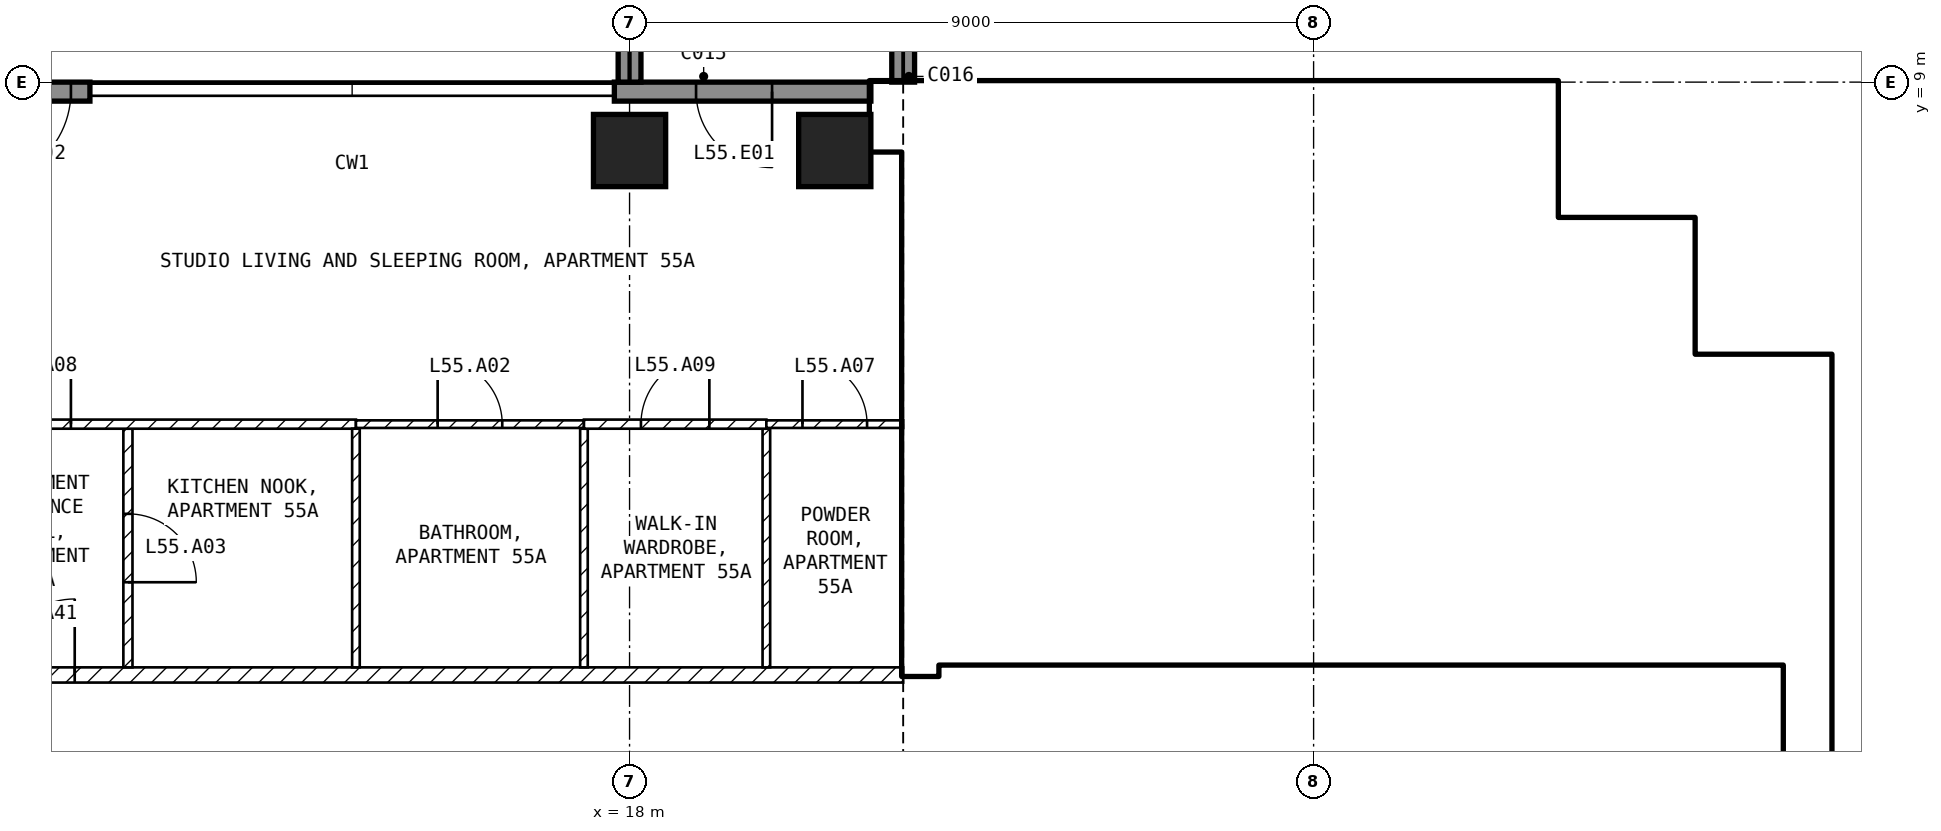
"""IFC4 building model, lengths in metres.
Left out: names, types, materials, properties, quantities, classifications, styles, units other than length and angle.
Written with IfcOpenShell. Run it as: python <this file> out.ifc"""

import sys

from ifc_helpers import new_model, si_unit, direction, frame, frame_2d, origin, origin_2d, place, context, subcontext, project, spatial, rectangle, extrude, element, fill, save


model = new_model("IFC4")
c1 = context("Model", 3, precision=1e-05, world=origin(), true_north=direction((0.0, 1.0)))
c2 = subcontext(c1, "Body", "Model", "MODEL_VIEW")
j1 = project(units=[si_unit("LENGTHUNIT", "METRE"), si_unit("PLANEANGLEUNIT", "RADIAN")], contexts=[c1])
p1 = place(None, origin())
s1 = spatial("IfcSite", under=j1, at=p1, CompositionType="ELEMENT")
p2 = place(p1, origin())
s2 = spatial("IfcBuilding", under=s1, at=p2, CompositionType="ELEMENT")
p3 = place(p2, frame((0.0, 0.0, 219.1)))
s3 = spatial("IfcBuildingStorey", under=s2, at=p3, CompositionType="ELEMENT", Elevation=219.1)
for number, where, z_axis, x_axis in (
    (1, (18.0, 8.1, -0.25), (0.0, 0.0, 1.0), (1.0, 0.0, 0.0)),
    (2, (20.7, 8.1, -0.25), (0.0, 0.0, 1.0), (1.0, 0.0, 0.0)),
):
    element("IfcColumn", number, at=place(p3, frame(where, z_axis=z_axis, x_axis=x_axis)), inside=s3, PredefinedType="COLUMN", context=c2, shape_type="SweptSolid", body=[
        extrude(rectangle(XDim=0.95, YDim=0.95, at=origin_2d()), origin(), (0.0, 0.0, 1.0), 3.45),
    ])
p4 = place(p3, frame((21.175, 8.875, 0.0), z_axis=(0.0, 0.0, 1.0), x_axis=(-1.0, 0.0, 0.0)))
e3 = element("IfcWall", 3, at=p4, inside=s3, PredefinedType="SOLIDWALL", context=c2, shape_type="SweptSolid", body=[
    extrude(rectangle(XDim=3.375, YDim=0.25, at=frame_2d((1.688, 0.0))), origin(), (0.0, 0.0, 1.0), 3.2),
])
p5 = place(p4, frame((1.3, 0.0, 0.0)))
e4 = element("IfcOpeningElement", 4, at=p5, cuts=e3, PredefinedType="OPENING", context=c2, shape_type="SweptSolid", body=[
    extrude(rectangle(XDim=1.0, YDim=2.4, at=frame_2d((0.5, 1.2))), frame((0.0, 0.135, 0.0), z_axis=(0.0, -1.0, 0.0), x_axis=(1.0, 0.0, 0.0)), (0.0, 0.0, 1.0), 0.27),
])
p6 = place(p3, frame((10.9, 8.875, 0.0), z_axis=(0.0, 0.0, 1.0), x_axis=(-1.0, 0.0, 0.0)))
e5 = element("IfcWall", 5, at=p6, inside=s3, PredefinedType="SOLIDWALL", context=c2, shape_type="SweptSolid", body=[
    extrude(rectangle(XDim=1.84, YDim=0.25, at=frame_2d((0.92, 0.0))), origin(), (0.0, 0.0, 1.0), 3.2),
])
p7 = place(p6, frame((0.25, 0.0, 0.0)))
e6 = element("IfcOpeningElement", 6, at=p7, cuts=e5, PredefinedType="OPENING", context=c2, shape_type="SweptSolid", body=[
    extrude(rectangle(XDim=1.2, YDim=2.4, at=frame_2d((0.6, 1.2))), frame((0.0, 0.135, 0.0), z_axis=(0.0, -1.0, 0.0), x_axis=(1.0, 0.0, 0.0)), (0.0, 0.0, 1.0), 0.27),
])
for number, where, z_axis, x_axis in (
    (7, (18.0, 9.0, 0.0), (0.0, 0.0, 1.0), (0.0, 1.0, 0.0)),
    (8, (21.6, 9.0, 0.0), (0.0, 0.0, 1.0), (0.0, 1.0, 0.0)),
):
    element("IfcWall", number, at=place(p3, frame(where, z_axis=z_axis, x_axis=x_axis)), inside=s3, PredefinedType="SOLIDWALL", context=c2, shape_type="SweptSolid", body=[
        extrude(rectangle(XDim=2.7, YDim=0.3, at=frame_2d((1.35, 0.0))), origin(), (0.0, 0.0, 1.0), 3.2),
    ])
p8 = place(p3, frame((33.5, -4.8, 0.0), z_axis=(0.0, 0.0, 1.0), x_axis=(0.0, 1.0, 0.0)))
e9 = element("IfcWall", 9, at=p8, inside=s3, PredefinedType="SHEAR", context=c2, shape_type="SweptSolid", body=[
    extrude(rectangle(XDim=10.2, YDim=0.6, at=frame_2d((5.1, 0.0))), origin(), (0.0, 0.0, 1.0), 3.2),
])
for number, where, z_axis, x_axis in (
    (10, (31.4, 5.1, 0.0), (0.0, 0.0, 1.0), (1.0, 0.0, 0.0)),
    (11, (31.7, 5.4, 0.0), (0.0, 0.0, 1.0), (0.0, 1.0, 0.0)),
):
    element("IfcWall", number, at=place(p3, frame(where, z_axis=z_axis, x_axis=x_axis)), inside=s3, PredefinedType="SHEAR", context=c2, shape_type="SweptSolid", body=[
        extrude(rectangle(XDim=1.8, YDim=0.6, at=frame_2d((0.9, 0.0))), origin(), (0.0, 0.0, 1.0), 3.2),
    ])
p9 = place(p3, frame((29.075, 6.9, 0.0), z_axis=(0.0, 0.0, 1.0), x_axis=(1.0, 0.0, 0.0)))
e12 = element("IfcWall", 12, at=p9, inside=s3, PredefinedType="SHEAR", context=c2, shape_type="SweptSolid", body=[
    extrude(rectangle(XDim=2.325, YDim=0.6, at=frame_2d((1.163, 0.0))), origin(), (0.0, 0.0, 1.0), 3.2),
])
p10 = place(p3, frame((29.9, 7.2, 0.0), z_axis=(0.0, 0.0, 1.0), x_axis=(0.0, 1.0, 0.0)))
e13 = element("IfcWall", 13, at=p10, inside=s3, PredefinedType="SHEAR", context=c2, shape_type="SweptSolid", body=[
    extrude(rectangle(XDim=1.8, YDim=0.6, at=frame_2d((0.9, 0.0))), origin(), (0.0, 0.0, 1.0), 3.2),
])
p11 = place(p3, frame((21.175, 8.55, 0.0), z_axis=(0.0, 0.0, 1.0), x_axis=(1.0, 0.0, 0.0)))
e14 = element("IfcWall", 14, at=p11, inside=s3, PredefinedType="SHEAR", context=c2, shape_type="SweptSolid", body=[
    extrude(rectangle(XDim=8.425, YDim=0.9, at=frame_2d((4.212, 0.0))), origin(), (0.0, 0.0, 1.0), 3.2),
])
p12 = place(p3, frame((21.825, 1.2, 0.0), z_axis=(0.0, 0.0, 1.0), x_axis=(0.0, 1.0, 0.0)))
e15 = element("IfcWall", 15, at=p12, inside=s3, PredefinedType="SHEAR", context=c2, shape_type="SweptSolid", body=[
    extrude(rectangle(XDim=6.9, YDim=0.45, at=frame_2d((3.45, 0.0))), origin(), (0.0, 0.0, 1.0), 3.2),
])
p13 = place(p3, frame((22.05, 1.45, 0.0), z_axis=(0.0, 0.0, 1.0), x_axis=(1.0, 0.0, 0.0)))
e16 = element("IfcWall", 16, at=p13, inside=s3, PredefinedType="SOLIDWALL", context=c2, shape_type="SweptSolid", body=[
    extrude(rectangle(XDim=11.15, YDim=0.2, at=frame_2d((5.575, 0.0))), origin(), (0.0, 0.0, 1.0), 3.2),
])
p14 = place(p13, frame((0.75, 0.0, 0.0)))
e17 = element("IfcOpeningElement", 17, at=p14, cuts=e16, PredefinedType="OPENING", context=c2, shape_type="SweptSolid", body=[
    extrude(rectangle(XDim=1.0, YDim=2.1, at=frame_2d((0.5, 1.05))), frame((0.0, 0.11, 0.0), z_axis=(0.0, -1.0, 0.0), x_axis=(1.0, 0.0, 0.0)), (0.0, 0.0, 1.0), 0.22),
])
p15 = place(p13, frame((3.25, 0.0, 0.0)))
e18 = element("IfcOpeningElement", 18, at=p15, cuts=e16, PredefinedType="OPENING", context=c2, shape_type="SweptSolid", body=[
    extrude(rectangle(XDim=1.0, YDim=2.1, at=frame_2d((0.5, 1.05))), frame((0.0, 0.11, 0.0), z_axis=(0.0, -1.0, 0.0), x_axis=(1.0, 0.0, 0.0)), (0.0, 0.0, 1.0), 0.22),
])
p16 = place(p13, frame((9.15, 0.0, 0.0)))
e19 = element("IfcOpeningElement", 19, at=p16, cuts=e16, PredefinedType="OPENING", context=c2, shape_type="SweptSolid", body=[
    extrude(rectangle(XDim=0.9, YDim=2.1, at=frame_2d((0.45, 1.05))), frame((0.0, 0.11, 0.0), z_axis=(0.0, -1.0, 0.0), x_axis=(1.0, 0.0, 0.0)), (0.0, 0.0, 1.0), 0.22),
])
p17 = place(p3, frame((22.05, 5.15, 0.0), z_axis=(0.0, 0.0, 1.0), x_axis=(1.0, 0.0, 0.0)))
e20 = element("IfcWall", 20, at=p17, inside=s3, PredefinedType="SOLIDWALL", context=c2, shape_type="SweptSolid", body=[
    extrude(rectangle(XDim=6.3, YDim=0.2, at=frame_2d((3.15, 0.0))), origin(), (0.0, 0.0, 1.0), 3.2),
])
p18 = place(p17, frame((0.2, 0.0, 0.0)))
e21 = element("IfcOpeningElement", 21, at=p18, cuts=e20, PredefinedType="OPENING", context=c2, shape_type="SweptSolid", body=[
    extrude(rectangle(XDim=1.0, YDim=2.1, at=frame_2d((0.5, 1.05))), frame((0.0, 0.11, 0.0), z_axis=(0.0, -1.0, 0.0), x_axis=(1.0, 0.0, 0.0)), (0.0, 0.0, 1.0), 0.22),
])
p19 = place(p3, frame((28.25, 5.25, 0.0), z_axis=(0.0, 0.0, 1.0), x_axis=(0.0, 1.0, 0.0)))
e22 = element("IfcWall", 22, at=p19, inside=s3, PredefinedType="SOLIDWALL", context=c2, shape_type="SweptSolid", body=[
    extrude(rectangle(XDim=2.85, YDim=0.2, at=frame_2d((1.425, 0.0))), origin(), (0.0, 0.0, 1.0), 3.2),
])
p20 = place(p3, frame((27.2, 3.95, 0.0), z_axis=(0.0, 0.0, 1.0), x_axis=(1.0, 0.0, 0.0)))
e23 = element("IfcWall", 23, at=p20, inside=s3, PredefinedType="SOLIDWALL", context=c2, shape_type="SweptSolid", body=[
    extrude(rectangle(XDim=6.0, YDim=0.2, at=frame_2d((3.0, 0.0))), origin(), (0.0, 0.0, 1.0), 3.2),
])
p21 = place(p3, frame((27.1, 1.55, 0.0), z_axis=(0.0, 0.0, 1.0), x_axis=(0.0, 1.0, 0.0)))
e24 = element("IfcWall", 24, at=p21, inside=s3, PredefinedType="SOLIDWALL", context=c2, shape_type="SweptSolid", body=[
    extrude(rectangle(XDim=3.5, YDim=0.2, at=frame_2d((1.75, 0.0))), origin(), (0.0, 0.0, 1.0), 3.2),
])
p22 = place(p21, frame((0.6, 0.0, 0.0)))
e25 = element("IfcOpeningElement", 25, at=p22, cuts=e24, PredefinedType="OPENING", context=c2, shape_type="SweptSolid", body=[
    extrude(rectangle(XDim=1.1, YDim=2.1, at=frame_2d((0.55, 1.05))), frame((0.0, 0.11, 0.0), z_axis=(0.0, -1.0, 0.0), x_axis=(1.0, 0.0, 0.0)), (0.0, 0.0, 1.0), 0.22),
])
p23 = place(p21, frame((2.6, 0.0, 0.0)))
e26 = element("IfcOpeningElement", 26, at=p23, cuts=e24, PredefinedType="OPENING", context=c2, shape_type="SweptSolid", body=[
    extrude(rectangle(XDim=0.8, YDim=2.1, at=frame_2d((0.4, 1.05))), frame((0.0, 0.11, 0.0), z_axis=(0.0, -1.0, 0.0), x_axis=(1.0, 0.0, 0.0)), (0.0, 0.0, 1.0), 0.22),
])
p24 = place(p3, frame((30.0, 1.55, 0.0), z_axis=(0.0, 0.0, 1.0), x_axis=(0.0, 1.0, 0.0)))
e27 = element("IfcWall", 27, at=p24, inside=s3, PredefinedType="SOLIDWALL", context=c2, shape_type="SweptSolid", body=[
    extrude(rectangle(XDim=2.3, YDim=0.2, at=frame_2d((1.15, 0.0))), origin(), (0.0, 0.0, 1.0), 3.2),
])
p25 = place(p3, frame((29.0, 4.05, 0.0), z_axis=(0.0, 0.0, 1.0), x_axis=(0.0, 1.0, 0.0)))
e28 = element("IfcWall", 28, at=p25, inside=s3, PredefinedType="PARTITIONING", context=c2, shape_type="SweptSolid", body=[
    extrude(rectangle(XDim=4.05, YDim=0.15, at=frame_2d((2.025, 0.0))), origin(), (0.0, 0.0, 1.0), 3.2),
])
p26 = place(p25, frame((0.1, 0.0, 0.0)))
e29 = element("IfcOpeningElement", 29, at=p26, cuts=e28, PredefinedType="OPENING", context=c2, shape_type="SweptSolid", body=[
    extrude(rectangle(XDim=0.8, YDim=2.1, at=frame_2d((0.4, 1.05))), frame((0.0, 0.085, 0.0), z_axis=(0.0, -1.0, 0.0), x_axis=(1.0, 0.0, 0.0)), (0.0, 0.0, 1.0), 0.17),
])
p27 = place(p3, frame((4.4, 1.2, 0.0), z_axis=(0.0, 0.0, 1.0), x_axis=(1.0, 0.0, 0.0)))
e30 = element("IfcWall", 30, at=p27, inside=s3, PredefinedType="PARTITIONING", context=c2, shape_type="SweptSolid", body=[
    extrude(rectangle(XDim=17.2, YDim=0.2, at=frame_2d((8.6, 0.0))), origin(), (0.0, 0.0, 1.0), 3.2),
])
p28 = place(p27, frame((5.3, 0.0, 0.0)))
e31 = element("IfcOpeningElement", 31, at=p28, cuts=e30, PredefinedType="OPENING", context=c2, shape_type="SweptSolid", body=[
    extrude(rectangle(XDim=1.0, YDim=2.1, at=frame_2d((0.5, 1.05))), frame((0.0, 0.11, 0.0), z_axis=(0.0, -1.0, 0.0), x_axis=(1.0, 0.0, 0.0)), (0.0, 0.0, 1.0), 0.22),
])
p29 = place(p3, frame((11.4, 4.44, 0.0), z_axis=(0.0, 0.0, 1.0), x_axis=(0.0, -1.0, 0.0)))
e32 = element("IfcWall", 32, at=p29, inside=s3, PredefinedType="PARTITIONING", context=c2, shape_type="SweptSolid", body=[
    extrude(rectangle(XDim=3.14, YDim=0.12, at=frame_2d((1.57, 0.0))), origin(), (0.0, 0.0, 1.0), 3.2),
])
p30 = place(p29, frame((1.12, 0.0, 0.0)))
e33 = element("IfcOpeningElement", 33, at=p30, cuts=e32, PredefinedType="OPENING", context=c2, shape_type="SweptSolid", body=[
    extrude(rectangle(XDim=0.9, YDim=2.1, at=frame_2d((0.45, 1.05))), frame((0.0, 0.07, 0.0), z_axis=(0.0, -1.0, 0.0), x_axis=(1.0, 0.0, 0.0)), (0.0, 0.0, 1.0), 0.14),
])
p31 = place(p3, frame((8.94, 4.5, 0.0), z_axis=(0.0, 0.0, 1.0), x_axis=(1.0, 0.0, 0.0)))
e34 = element("IfcWall", 34, at=p31, inside=s3, PredefinedType="PARTITIONING", context=c2, shape_type="SweptSolid", body=[
    extrude(rectangle(XDim=5.46, YDim=0.12, at=frame_2d((2.73, 0.0))), origin(), (0.0, 0.0, 1.0), 3.2),
])
p32 = place(p31, frame((0.81, 0.0, 0.0)))
e35 = element("IfcOpeningElement", 35, at=p32, cuts=e34, PredefinedType="OPENING", context=c2, shape_type="SweptSolid", body=[
    extrude(rectangle(XDim=0.9, YDim=2.1, at=frame_2d((0.45, 1.05))), frame((0.0, 0.07, 0.0), z_axis=(0.0, -1.0, 0.0), x_axis=(1.0, 0.0, 0.0)), (0.0, 0.0, 1.0), 0.14),
])
for number, where, z_axis, x_axis in (
    (36, (14.4, 4.44, 0.0), (0.0, 0.0, 1.0), (0.0, -1.0, 0.0)),
    (37, (17.4, 4.44, 0.0), (0.0, 0.0, 1.0), (0.0, -1.0, 0.0)),
):
    element("IfcWall", number, at=place(p3, frame(where, z_axis=z_axis, x_axis=x_axis)), inside=s3, PredefinedType="PARTITIONING", context=c2, shape_type="SweptSolid", body=[
        extrude(rectangle(XDim=3.14, YDim=0.1, at=frame_2d((1.57, 0.0))), origin(), (0.0, 0.0, 1.0), 3.2),
    ])
p33 = place(p3, frame((14.4, 4.5, 0.0), z_axis=(0.0, 0.0, 1.0), x_axis=(1.0, 0.0, 0.0)))
e38 = element("IfcWall", 38, at=p33, inside=s3, PredefinedType="PARTITIONING", context=c2, shape_type="SweptSolid", body=[
    extrude(rectangle(XDim=3.0, YDim=0.1, at=frame_2d((1.5, 0.0))), origin(), (0.0, 0.0, 1.0), 3.2),
])
p34 = place(p33, frame((1.075, 0.0, 0.0)))
e39 = element("IfcOpeningElement", 39, at=p34, cuts=e38, PredefinedType="OPENING", context=c2, shape_type="SweptSolid", body=[
    extrude(rectangle(XDim=0.85, YDim=2.1, at=frame_2d((0.425, 1.05))), frame((0.0, 0.06, 0.0), z_axis=(0.0, -1.0, 0.0), x_axis=(1.0, 0.0, 0.0)), (0.0, 0.0, 1.0), 0.12),
])
p35 = place(p3, frame((19.8, 4.44, 0.0), z_axis=(0.0, 0.0, 1.0), x_axis=(0.0, -1.0, 0.0)))
e40 = element("IfcWall", 40, at=p35, inside=s3, PredefinedType="PARTITIONING", context=c2, shape_type="SweptSolid", body=[
    extrude(rectangle(XDim=3.14, YDim=0.1, at=frame_2d((1.57, 0.0))), origin(), (0.0, 0.0, 1.0), 3.2),
])
p36 = place(p3, frame((17.4, 4.5, 0.0), z_axis=(0.0, 0.0, 1.0), x_axis=(1.0, 0.0, 0.0)))
e41 = element("IfcWall", 41, at=p36, inside=s3, PredefinedType="PARTITIONING", context=c2, shape_type="SweptSolid", body=[
    extrude(rectangle(XDim=2.4, YDim=0.12, at=frame_2d((1.2, 0.0))), origin(), (0.0, 0.0, 1.0), 3.2),
])
p37 = place(p36, frame((0.75, 0.0, 0.0)))
e42 = element("IfcOpeningElement", 42, at=p37, cuts=e41, PredefinedType="OPENING", context=c2, shape_type="SweptSolid", body=[
    extrude(rectangle(XDim=0.9, YDim=2.1, at=frame_2d((0.45, 1.05))), frame((0.0, 0.07, 0.0), z_axis=(0.0, -1.0, 0.0), x_axis=(1.0, 0.0, 0.0)), (0.0, 0.0, 1.0), 0.14),
])
p38 = place(p3, frame((19.8, 4.5, 0.0), z_axis=(0.0, 0.0, 1.0), x_axis=(1.0, 0.0, 0.0)))
e43 = element("IfcWall", 43, at=p38, inside=s3, PredefinedType="PARTITIONING", context=c2, shape_type="SweptSolid", body=[
    extrude(rectangle(XDim=1.8, YDim=0.1, at=frame_2d((0.9, 0.0))), origin(), (0.0, 0.0, 1.0), 3.2),
])
p39 = place(p38, frame((0.475, 0.0, 0.0)))
e44 = element("IfcOpeningElement", 44, at=p39, cuts=e43, PredefinedType="OPENING", context=c2, shape_type="SweptSolid", body=[
    extrude(rectangle(XDim=0.85, YDim=2.1, at=frame_2d((0.425, 1.05))), frame((0.0, 0.06, 0.0), z_axis=(0.0, -1.0, 0.0), x_axis=(1.0, 0.0, 0.0)), (0.0, 0.0, 1.0), 0.12),
])
p40 = place(p5, origin())
e45 = element("IfcDoor", 45, at=p40, inside=s3, OperationType="SINGLE_SWING_LEFT", PredefinedType="DOOR", context=c2, shape_type="SweptSolid", body=[
    extrude(rectangle(XDim=1.0, YDim=2.4, at=frame_2d((0.5, 1.2))), frame((0.0, 0.025, 0.0), z_axis=(0.0, -1.0, 0.0), x_axis=(1.0, 0.0, 0.0)), (0.0, 0.0, 1.0), 0.05),
])
fill(e4, e45)
p41 = place(p7, origin())
e46 = element("IfcDoor", 46, at=p41, inside=s3, OperationType="SINGLE_SWING_RIGHT", PredefinedType="DOOR", context=c2, shape_type="SweptSolid", body=[
    extrude(rectangle(XDim=1.2, YDim=2.4, at=frame_2d((0.6, 1.2))), frame((0.0, 0.025, 0.0), z_axis=(0.0, -1.0, 0.0), x_axis=(1.0, 0.0, 0.0)), (0.0, 0.0, 1.0), 0.05),
])
fill(e6, e46)
p42 = place(p22, origin())
e47 = element("IfcDoor", 47, at=p42, inside=s3, OperationType="DOUBLE_DOOR_SLIDING", PredefinedType="DOOR", context=c2, shape_type="SweptSolid", body=[
    extrude(rectangle(XDim=1.1, YDim=2.1, at=frame_2d((0.55, 1.05))), frame((0.0, 0.025, 0.0), z_axis=(0.0, -1.0, 0.0), x_axis=(1.0, 0.0, 0.0)), (0.0, 0.0, 1.0), 0.05),
])
fill(e25, e47)
p43 = place(p18, origin())
e48 = element("IfcDoor", 48, at=p43, inside=s3, OperationType="SINGLE_SWING_LEFT", PredefinedType="DOOR", context=c2, shape_type="SweptSolid", body=[
    extrude(rectangle(XDim=1.0, YDim=2.1, at=frame_2d((0.5, 1.05))), frame((0.0, 0.025, 0.0), z_axis=(0.0, -1.0, 0.0), x_axis=(1.0, 0.0, 0.0)), (0.0, 0.0, 1.0), 0.05),
])
fill(e21, e48)
p44 = place(p14, origin())
e49 = element("IfcDoor", 49, at=p44, inside=s3, OperationType="SINGLE_SWING_LEFT", PredefinedType="DOOR", context=c2, shape_type="SweptSolid", body=[
    extrude(rectangle(XDim=1.0, YDim=2.1, at=frame_2d((0.5, 1.05))), frame((0.0, 0.025, 0.0), z_axis=(0.0, -1.0, 0.0), x_axis=(1.0, 0.0, 0.0)), (0.0, 0.0, 1.0), 0.05),
])
fill(e17, e49)
p45 = place(p15, origin())
e50 = element("IfcDoor", 50, at=p45, inside=s3, OperationType="SINGLE_SWING_LEFT", PredefinedType="DOOR", context=c2, shape_type="SweptSolid", body=[
    extrude(rectangle(XDim=1.0, YDim=2.1, at=frame_2d((0.5, 1.05))), frame((0.0, 0.025, 0.0), z_axis=(0.0, -1.0, 0.0), x_axis=(1.0, 0.0, 0.0)), (0.0, 0.0, 1.0), 0.05),
])
fill(e18, e50)
p46 = place(p23, origin())
e51 = element("IfcDoor", 51, at=p46, inside=s3, OperationType="SINGLE_SWING_LEFT", PredefinedType="DOOR", context=c2, shape_type="SweptSolid", body=[
    extrude(rectangle(XDim=0.8, YDim=2.1, at=frame_2d((0.4, 1.05))), frame((0.0, 0.025, 0.0), z_axis=(0.0, -1.0, 0.0), x_axis=(1.0, 0.0, 0.0)), (0.0, 0.0, 1.0), 0.05),
])
fill(e26, e51)
p47 = place(p26, origin())
e52 = element("IfcDoor", 52, at=p47, inside=s3, OperationType="SINGLE_SWING_LEFT", PredefinedType="DOOR", context=c2, shape_type="SweptSolid", body=[
    extrude(rectangle(XDim=0.8, YDim=2.1, at=frame_2d((0.4, 1.05))), frame((0.0, 0.025, 0.0), z_axis=(0.0, -1.0, 0.0), x_axis=(1.0, 0.0, 0.0)), (0.0, 0.0, 1.0), 0.05),
])
fill(e29, e52)
p48 = place(p16, origin())
e53 = element("IfcDoor", 53, at=p48, inside=s3, OperationType="SINGLE_SWING_LEFT", PredefinedType="DOOR", context=c2, shape_type="SweptSolid", body=[
    extrude(rectangle(XDim=0.9, YDim=2.1, at=frame_2d((0.45, 1.05))), frame((0.0, 0.025, 0.0), z_axis=(0.0, -1.0, 0.0), x_axis=(1.0, 0.0, 0.0)), (0.0, 0.0, 1.0), 0.05),
])
fill(e19, e53)
p49 = place(p34, origin())
e54 = element("IfcDoor", 54, at=p49, inside=s3, OperationType="SINGLE_SWING_LEFT", PredefinedType="DOOR", context=c2, shape_type="SweptSolid", body=[
    extrude(rectangle(XDim=0.85, YDim=2.1, at=frame_2d((0.425, 1.05))), frame((0.0, 0.025, 0.0), z_axis=(0.0, -1.0, 0.0), x_axis=(1.0, 0.0, 0.0)), (0.0, 0.0, 1.0), 0.05),
])
fill(e39, e54)
p50 = place(p30, origin())
e55 = element("IfcDoor", 55, at=p50, inside=s3, OperationType="SINGLE_SWING_RIGHT", PredefinedType="DOOR", context=c2, shape_type="SweptSolid", body=[
    extrude(rectangle(XDim=0.9, YDim=2.1, at=frame_2d((0.45, 1.05))), frame((0.0, 0.025, 0.0), z_axis=(0.0, -1.0, 0.0), x_axis=(1.0, 0.0, 0.0)), (0.0, 0.0, 1.0), 0.05),
])
fill(e33, e55)
p51 = place(p39, origin())
e56 = element("IfcDoor", 56, at=p51, inside=s3, OperationType="SINGLE_SWING_LEFT", PredefinedType="DOOR", context=c2, shape_type="SweptSolid", body=[
    extrude(rectangle(XDim=0.85, YDim=2.1, at=frame_2d((0.425, 1.05))), frame((0.0, 0.025, 0.0), z_axis=(0.0, -1.0, 0.0), x_axis=(1.0, 0.0, 0.0)), (0.0, 0.0, 1.0), 0.05),
])
fill(e44, e56)
p52 = place(p32, origin())
e57 = element("IfcDoor", 57, at=p52, inside=s3, OperationType="SINGLE_SWING_RIGHT", PredefinedType="DOOR", context=c2, shape_type="SweptSolid", body=[
    extrude(rectangle(XDim=0.9, YDim=2.1, at=frame_2d((0.45, 1.05))), frame((0.0, 0.025, 0.0), z_axis=(0.0, -1.0, 0.0), x_axis=(1.0, 0.0, 0.0)), (0.0, 0.0, 1.0), 0.05),
])
fill(e35, e57)
p53 = place(p37, origin())
e58 = element("IfcDoor", 58, at=p53, inside=s3, OperationType="SINGLE_SWING_RIGHT", PredefinedType="DOOR", context=c2, shape_type="SweptSolid", body=[
    extrude(rectangle(XDim=0.9, YDim=2.1, at=frame_2d((0.45, 1.05))), frame((0.0, 0.025, 0.0), z_axis=(0.0, -1.0, 0.0), x_axis=(1.0, 0.0, 0.0)), (0.0, 0.0, 1.0), 0.05),
])
fill(e42, e58)
p54 = place(p28, origin())
e59 = element("IfcDoor", 59, at=p54, inside=s3, OperationType="SINGLE_SWING_RIGHT", PredefinedType="DOOR", context=c2, shape_type="SweptSolid", body=[
    extrude(rectangle(XDim=1.0, YDim=2.1, at=frame_2d((0.5, 1.05))), frame((0.0, 0.025, 0.0), z_axis=(0.0, -1.0, 0.0), x_axis=(1.0, 0.0, 0.0)), (0.0, 0.0, 1.0), 0.05),
])
fill(e31, e59)
save(model, sys.argv[1])
